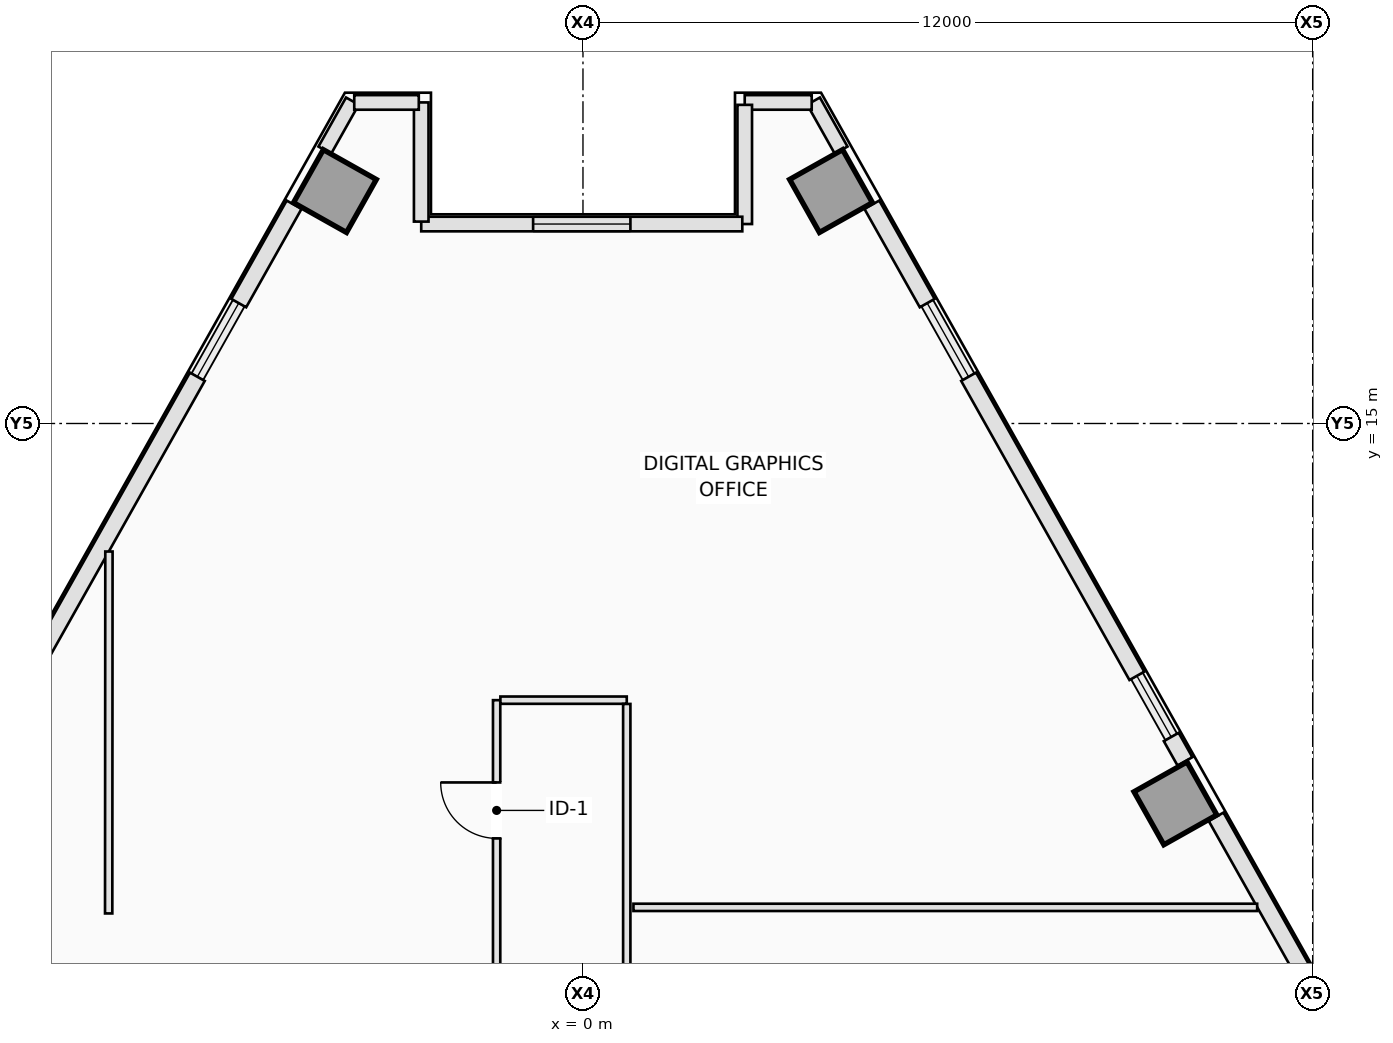
"""IFC4 building model, lengths in metres.
Left out: names, types, materials, properties, quantities, classifications, styles, units other than length and angle.
Written with IfcOpenShell. Run it as: python <this file> out.ifc"""

import sys

from ifc_helpers import new_model, si_unit, direction, frame, frame_2d, origin, origin_2d, place, context, subcontext, project, spatial, rectangle, extrude, element, fill, save


model = new_model("IFC4")
c1 = context("Model", 3, precision=1e-05, world=origin(), true_north=direction((0.0, 1.0)))
c2 = subcontext(c1, "Body", "Model", "MODEL_VIEW")
j1 = project(units=[si_unit("LENGTHUNIT", "METRE"), si_unit("PLANEANGLEUNIT", "RADIAN")], contexts=[c1])
p1 = place(None, origin())
s1 = spatial("IfcSite", under=j1, at=p1, CompositionType="ELEMENT")
p2 = place(p1, origin())
s2 = spatial("IfcBuilding", under=s1, at=p2, CompositionType="ELEMENT")
p3 = place(p2, frame((0.0, 0.0, 130.0)))
s3 = spatial("IfcBuildingStorey", under=s2, at=p3, CompositionType="ELEMENT", Elevation=130.0)
for number, where, z_axis, x_axis in (
    (1, (9.743, 8.753, 0.0), (0.0, 0.0, 1.0), (0.872, 0.49, 0.0)),
    (2, (4.079, 18.822, 0.0), (0.0, 0.0, 1.0), (0.872, 0.49, 0.0)),
    (3, (-4.079, 18.822, 0.0), (0.0, 0.0, 1.0), (-0.872, 0.49, 0.0)),
):
    element("IfcColumn", number, at=place(p3, frame(where, z_axis=z_axis, x_axis=x_axis)), inside=s3, PredefinedType="COLUMN", context=c2, shape_type="SweptSolid", body=[
        extrude(rectangle(XDim=1.0, YDim=1.0, at=origin_2d()), origin(), (0.0, 0.0, 1.0), 3.5),
    ])
p4 = place(p3, frame((3.792, 20.302, 0.0), z_axis=(0.0, 0.0, 1.0), x_axis=(0.490048346303, -0.871695255399, 0.0)))
e4 = element("IfcWall", 4, at=p4, inside=s3, PredefinedType="STANDARD", context=c2, shape_type="SweptSolid", body=[
    extrude(rectangle(XDim=0.926, YDim=0.24, at=frame_2d((0.463, 0.0))), origin(), (0.0, 0.0, 1.0), 3.25),
])
p5 = place(p3, frame((4.751, 18.597, 0.0), z_axis=(0.0, 0.0, 1.0), x_axis=(0.490248749158, -0.871582562899, 0.0)))
e5 = element("IfcWall", 5, at=p5, inside=s3, PredefinedType="STANDARD", context=c2, shape_type="SweptSolid", body=[
    extrude(rectangle(XDim=1.856, YDim=0.28, at=frame_2d((0.928, 0.0))), origin(), (0.0, 0.0, 1.0), 3.25),
])
p6 = place(p3, frame((6.342, 15.768, 0.0), z_axis=(0.0, 0.0, 1.0), x_axis=(0.490289995219, -0.871559361483, 0.0)))
e6 = element("IfcWall", 6, at=p6, inside=s3, PredefinedType="STANDARD", context=c2, shape_type="SweptSolid", body=[
    extrude(rectangle(XDim=5.643, YDim=0.28, at=frame_2d((2.822, 0.0))), origin(), (0.0, 0.0, 1.0), 3.25),
])
p7 = place(p3, frame((9.674, 9.845, 0.0), z_axis=(0.0, 0.0, 1.0), x_axis=(0.490412424957, -0.871490478116, 0.0)))
e7 = element("IfcWall", 7, at=p7, inside=s3, PredefinedType="STANDARD", context=c2, shape_type="SweptSolid", body=[
    extrude(rectangle(XDim=0.46, YDim=0.28, at=frame_2d((0.23, 0.0))), origin(), (0.0, 0.0, 1.0), 3.25),
])
p8 = place(p3, frame((10.412, 8.533, 0.0), z_axis=(0.0, 0.0, 1.0), x_axis=(0.490274486291, -0.871568085747, 0.0)))
e8 = element("IfcWall", 8, at=p8, inside=s3, PredefinedType="STANDARD", context=c2, shape_type="SweptSolid", body=[
    extrude(rectangle(XDim=4.375, YDim=0.28, at=frame_2d((2.188, 0.0))), origin(), (0.0, 0.0, 1.0), 3.25),
])
p9 = place(p3, frame((-4.246, 19.495, 0.0), z_axis=(0.0, 0.0, 1.0), x_axis=(0.490048346303, 0.871695255399, 0.0)))
e9 = element("IfcWall", 9, at=p9, inside=s3, PredefinedType="STANDARD", context=c2, shape_type="SweptSolid", body=[
    extrude(rectangle(XDim=0.926, YDim=0.24, at=frame_2d((0.463, 0.0))), origin(), (0.0, 0.0, 1.0), 3.25),
])
p10 = place(p3, frame((-9.109, 10.85, 0.0), z_axis=(0.0, 0.0, 1.0), x_axis=(0.490289995219, 0.871559361483, 0.0)))
e10 = element("IfcWall", 10, at=p10, inside=s3, PredefinedType="STANDARD", context=c2, shape_type="SweptSolid", body=[
    extrude(rectangle(XDim=5.643, YDim=0.28, at=frame_2d((2.822, 0.0))), origin(), (0.0, 0.0, 1.0), 3.25),
])
p11 = place(p3, frame((-5.661, 16.98, 0.0), z_axis=(0.0, 0.0, 1.0), x_axis=(0.490248749158, 0.871582562899, 0.0)))
e11 = element("IfcWall", 11, at=p11, inside=s3, PredefinedType="STANDARD", context=c2, shape_type="SweptSolid", body=[
    extrude(rectangle(XDim=1.856, YDim=0.28, at=frame_2d((0.928, 0.0))), origin(), (0.0, 0.0, 1.0), 3.25),
])
p12 = place(p3, frame((3.761, 20.28, 0.0), z_axis=(0.0, 0.0, 1.0), x_axis=(-1.0, 0.0, 0.0)))
e12 = element("IfcWall", 12, at=p12, inside=s3, PredefinedType="STANDARD", context=c2, shape_type="SweptSolid", body=[
    extrude(rectangle(XDim=1.102, YDim=0.24, at=frame_2d((0.551, 0.0))), origin(), (0.0, 0.0, 1.0), 3.25),
])
p13 = place(p3, frame((2.66, 20.24, 0.0), z_axis=(0.0, 0.0, 1.0), x_axis=(0.0, -1.0, 0.0)))
e13 = element("IfcWall", 13, at=p13, inside=s3, PredefinedType="STANDARD", context=c2, shape_type="SweptSolid", body=[
    extrude(rectangle(XDim=1.96, YDim=0.24, at=frame_2d((0.98, 0.0))), origin(), (0.0, 0.0, 1.0), 3.25),
])
p14 = place(p3, frame((2.62, 18.28, 0.0), z_axis=(0.0, 0.0, 1.0), x_axis=(-1.0, 0.0, 0.0)))
e14 = element("IfcWall", 14, at=p14, inside=s3, PredefinedType="STANDARD", context=c2, shape_type="SweptSolid", body=[
    extrude(rectangle(XDim=5.28, YDim=0.24, at=frame_2d((2.64, 0.0))), origin(), (0.0, 0.0, 1.0), 3.25),
])
p15 = place(p14, frame((1.84, 0.0, 0.9)))
e15 = element("IfcOpeningElement", 15, at=p15, cuts=e14, PredefinedType="OPENING", context=c2, shape_type="SweptSolid", body=[
    extrude(rectangle(XDim=1.6, YDim=2.1, at=frame_2d((0.8, 1.05))), frame((0.0, 0.13, 0.0), z_axis=(0.0, -1.0, 0.0), x_axis=(1.0, 0.0, 0.0)), (0.0, 0.0, 1.0), 0.26),
])
p16 = place(p3, frame((-2.66, 18.32, 0.0), z_axis=(0.0, 0.0, 1.0), x_axis=(0.0, 1.0, 0.0)))
e16 = element("IfcWall", 16, at=p16, inside=s3, PredefinedType="STANDARD", context=c2, shape_type="SweptSolid", body=[
    extrude(rectangle(XDim=1.96, YDim=0.24, at=frame_2d((0.98, 0.0))), origin(), (0.0, 0.0, 1.0), 3.25),
])
p17 = place(p3, frame((-2.7, 20.28, 0.0), z_axis=(0.0, 0.0, 1.0), x_axis=(-1.0, 0.0, 0.0)))
e17 = element("IfcWall", 17, at=p17, inside=s3, PredefinedType="STANDARD", context=c2, shape_type="SweptSolid", body=[
    extrude(rectangle(XDim=1.062, YDim=0.24, at=frame_2d((0.531, 0.0))), origin(), (0.0, 0.0, 1.0), 3.25),
])
p18 = place(p3, frame((-1.42, -2.338, 0.0), z_axis=(0.0, 0.0, 1.0), x_axis=(0.0, 1.0, 0.0)))
e18 = element("IfcWall", 18, at=p18, inside=s3, PredefinedType="PARTITIONING", context=c2, shape_type="SweptSolid", body=[
    extrude(rectangle(XDim=12.788, YDim=0.12, at=frame_2d((6.394, 0.0))), origin(), (0.0, 0.0, 1.0), 3.25),
])
p19 = place(p18, frame((10.515, 0.0, 0.0)))
e19 = element("IfcOpeningElement", 19, at=p19, cuts=e18, PredefinedType="OPENING", context=c2, shape_type="SweptSolid", body=[
    extrude(rectangle(XDim=0.92, YDim=2.12, at=frame_2d((0.46, 1.06))), frame((0.0, 0.07, 0.0), z_axis=(0.0, -1.0, 0.0), x_axis=(1.0, 0.0, 0.0)), (0.0, 0.0, 1.0), 0.14),
])
p20 = place(p18, frame((6.578, 0.0, 0.0)))
e20 = element("IfcOpeningElement", 20, at=p20, cuts=e18, PredefinedType="OPENING", context=c2, shape_type="SweptSolid", body=[
    extrude(rectangle(XDim=0.92, YDim=2.12, at=frame_2d((0.46, 1.06))), frame((0.0, 0.07, 0.0), z_axis=(0.0, -1.0, 0.0), x_axis=(1.0, 0.0, 0.0)), (0.0, 0.0, 1.0), 0.14),
])
p21 = place(p18, frame((3.978, 0.0, 0.0)))
e21 = element("IfcOpeningElement", 21, at=p21, cuts=e18, PredefinedType="OPENING", context=c2, shape_type="SweptSolid", body=[
    extrude(rectangle(XDim=0.92, YDim=2.12, at=frame_2d((0.46, 1.06))), frame((0.0, 0.07, 0.0), z_axis=(0.0, -1.0, 0.0), x_axis=(1.0, 0.0, 0.0)), (0.0, 0.0, 1.0), 0.14),
])
p22 = place(p3, frame((-1.358, 10.45, 0.0), z_axis=(0.0, 0.0, 1.0), x_axis=(1.0, 0.0, 0.0)))
e22 = element("IfcWall", 22, at=p22, inside=s3, PredefinedType="PARTITIONING", context=c2, shape_type="SweptSolid", body=[
    extrude(rectangle(XDim=2.078, YDim=0.12, at=frame_2d((1.039, 0.0))), origin(), (0.0, 0.0, 1.0), 3.25),
])
p23 = place(p3, frame((0.72, 10.388, 0.0), z_axis=(0.0, 0.0, 1.0), x_axis=(0.0, -1.0, 0.0)))
e23 = element("IfcWall", 23, at=p23, inside=s3, PredefinedType="PARTITIONING", context=c2, shape_type="SweptSolid", body=[
    extrude(rectangle(XDim=12.788, YDim=0.12, at=frame_2d((6.394, 0.0))), origin(), (0.0, 0.0, 1.0), 3.25),
])
p24 = place(p23, frame((4.409, 0.0, 0.0)))
e24 = element("IfcOpeningElement", 24, at=p24, cuts=e23, PredefinedType="OPENING", context=c2, shape_type="SweptSolid", body=[
    extrude(rectangle(XDim=0.92, YDim=2.12, at=frame_2d((0.46, 1.06))), frame((0.0, 0.07, 0.0), z_axis=(0.0, -1.0, 0.0), x_axis=(1.0, 0.0, 0.0)), (0.0, 0.0, 1.0), 0.14),
])
p25 = place(p23, frame((9.021, 0.0, 0.0)))
e25 = element("IfcOpeningElement", 25, at=p25, cuts=e23, PredefinedType="OPENING", context=c2, shape_type="SweptSolid", body=[
    extrude(rectangle(XDim=0.92, YDim=2.12, at=frame_2d((0.46, 1.06))), frame((0.0, 0.07, 0.0), z_axis=(0.0, -1.0, 0.0), x_axis=(1.0, 0.0, 0.0)), (0.0, 0.0, 1.0), 0.14),
])
p26 = place(p3, frame((-7.8, 6.943, 0.0), z_axis=(0.0, 0.0, 1.0), x_axis=(0.000738370461, 0.999999727404, 0.0)))
e26 = element("IfcWall", 26, at=p26, inside=s3, PredefinedType="PARTITIONING", context=c2, shape_type="SweptSolid", body=[
    extrude(rectangle(XDim=5.952, YDim=0.12, at=frame_2d((2.976, 0.0))), origin(), (0.0, 0.0, 1.0), 3.25),
])
p27 = place(p3, frame((11.087, 7.043, 0.0), z_axis=(0.0, 0.0, 1.0), x_axis=(-1.0, 0.0, 0.0)))
e27 = element("IfcWall", 27, at=p27, inside=s3, PredefinedType="PARTITIONING", context=c2, shape_type="SweptSolid", body=[
    extrude(rectangle(XDim=10.257, YDim=0.12, at=frame_2d((5.128, 0.0))), origin(), (0.0, 0.0, 1.0), 3.25),
])
p28 = place(p15, origin())
e28 = element("IfcWindow", 28, at=p28, inside=s3, PartitioningType="SINGLE_PANEL", PredefinedType="WINDOW", context=c2, shape_type="SweptSolid", body=[
    extrude(rectangle(XDim=1.6, YDim=2.1, at=frame_2d((0.8, 1.05))), frame((0.0, 0.03, 0.0), z_axis=(0.0, -1.0, 0.0), x_axis=(1.0, 0.0, 0.0)), (0.0, 0.0, 1.0), 0.06),
])
fill(e15, e28)
p29 = place(p19, origin())
e29 = element("IfcDoor", 29, at=p29, inside=s3, OperationType="SINGLE_SWING_RIGHT", PredefinedType="DOOR", context=c2, shape_type="SweptSolid", body=[
    extrude(rectangle(XDim=0.92, YDim=2.12, at=frame_2d((0.46, 1.06))), frame((0.0, 0.025, 0.0), z_axis=(0.0, -1.0, 0.0), x_axis=(1.0, 0.0, 0.0)), (0.0, 0.0, 1.0), 0.05),
])
fill(e19, e29)
save(model, sys.argv[1])
